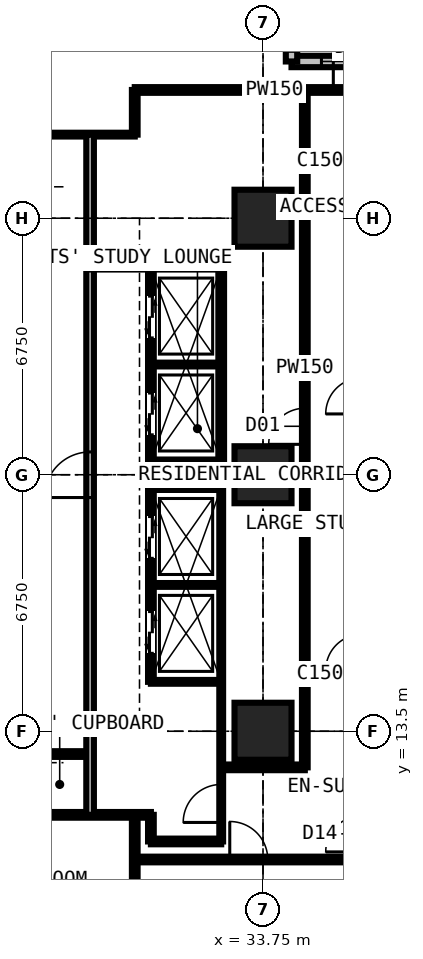
"""IFC4 building model, lengths in metres.
Left out: names, types, materials, properties, quantities, classifications, styles, units other than length and angle.
Written with IfcOpenShell. Run it as: python <this file> out.ifc"""

import sys

from ifc_helpers import new_model, si_unit, direction, frame, frame_2d, origin, origin_2d, place, context, subcontext, project, spatial, rectangle, extrude, element, fill, save


model = new_model("IFC4")
c1 = context("Model", 3, precision=1e-05, world=origin(), true_north=direction((0.0, 1.0)))
c2 = subcontext(c1, "Body", "Model", "MODEL_VIEW")
j1 = project(units=[si_unit("LENGTHUNIT", "METRE"), si_unit("PLANEANGLEUNIT", "RADIAN")], contexts=[c1])
p1 = place(None, origin())
s1 = spatial("IfcSite", under=j1, at=p1, CompositionType="ELEMENT")
p2 = place(p1, origin())
s2 = spatial("IfcBuilding", under=s1, at=p2, CompositionType="ELEMENT")
p3 = place(p2, frame((0.0, 0.0, 123.3)))
s3 = spatial("IfcBuildingStorey", under=s2, at=p3, CompositionType="ELEMENT", Elevation=123.3)
for number, where, z_axis, x_axis in (
    (1, (33.75, 13.5, 0.0), (0.0, 0.0, 1.0), (1.0, 0.0, 0.0)),
    (2, (33.75, 20.25, 0.0), (0.0, 0.0, 1.0), (1.0, 0.0, 0.0)),
    (3, (33.75, 27.0, 0.0), (0.0, 0.0, 1.0), (1.0, 0.0, 0.0)),
):
    element("IfcColumn", number, at=place(p3, frame(where, z_axis=z_axis, x_axis=x_axis)), inside=s3, PredefinedType="COLUMN", context=c2, shape_type="SweptSolid", body=[
        extrude(rectangle(XDim=1.5, YDim=1.5, at=origin_2d()), origin(), (0.0, 0.0, 1.0), 3.6),
    ])
p4 = place(p3, frame((37.875, 31.125, 0.0), z_axis=(0.0, 0.0, 1.0), x_axis=(-1.0, 0.0, 0.0)))
e4 = element("IfcWall", 4, at=p4, inside=s3, PredefinedType="SOLIDWALL", context=c2, shape_type="SweptSolid", body=[
    extrude(rectangle(XDim=3.375, YDim=0.3, at=frame_2d((1.688, 0.0))), origin(), (0.0, 0.0, 1.0), 3.375),
])
p5 = place(p4, frame((0.788, 0.0, 0.6)))
e5 = element("IfcOpeningElement", 5, at=p5, cuts=e4, PredefinedType="OPENING", context=c2, shape_type="SweptSolid", body=[
    extrude(rectangle(XDim=1.8, YDim=2.1, at=frame_2d((0.9, 1.05))), frame((0.0, 0.16, 0.0), z_axis=(0.0, -1.0, 0.0), x_axis=(1.0, 0.0, 0.0)), (0.0, 0.0, 1.0), 0.32),
])
p6 = place(p3, frame((34.5, 31.125, 0.0), z_axis=(0.0, 0.0, 1.0), x_axis=(0.0, 1.0, 0.0)))
e6 = element("IfcWall", 6, at=p6, inside=s3, PredefinedType="SOLIDWALL", context=c2, shape_type="SweptSolid", body=[
    extrude(rectangle(XDim=3.375, YDim=0.3, at=frame_2d((1.688, 0.0))), origin(), (0.0, 0.0, 1.0), 3.375),
])
p7 = place(p6, frame((0.268, 0.0, 0.9)))
e7 = element("IfcOpeningElement", 7, at=p7, cuts=e6, PredefinedType="OPENING", context=c2, shape_type="SweptSolid", body=[
    extrude(rectangle(XDim=1.5, YDim=1.8, at=frame_2d((0.75, 0.9))), frame((0.0, 0.16, 0.0), z_axis=(0.0, -1.0, 0.0), x_axis=(1.0, 0.0, 0.0)), (0.0, 0.0, 1.0), 0.32),
])
p8 = place(p3, frame((10.125, 11.3, 0.0), z_axis=(0.0, 0.0, 1.0), x_axis=(1.0, 0.0, 0.0)))
e8 = element("IfcWall", 8, at=p8, inside=s3, PredefinedType="PARTITIONING", context=c2, shape_type="SweptSolid", body=[
    extrude(rectangle(XDim=20.675, YDim=0.15, at=frame_2d((10.337, 0.0))), origin(), (0.0, 0.0, 1.0), 3.375),
])
p9 = place(p8, frame((8.375, 0.0, 0.0)))
e9 = element("IfcOpeningElement", 9, at=p9, cuts=e8, PredefinedType="OPENING", context=c2, shape_type="SweptSolid", body=[
    extrude(rectangle(XDim=1.0, YDim=2.2, at=frame_2d((0.5, 1.1))), frame((0.0, 0.085, 0.0), z_axis=(0.0, -1.0, 0.0), x_axis=(1.0, 0.0, 0.0)), (0.0, 0.0, 1.0), 0.17),
])
p10 = place(p8, frame((10.975, 0.0, 0.0)))
e10 = element("IfcOpeningElement", 10, at=p10, cuts=e8, PredefinedType="OPENING", context=c2, shape_type="SweptSolid", body=[
    extrude(rectangle(XDim=1.0, YDim=2.2, at=frame_2d((0.5, 1.1))), frame((0.0, 0.085, 0.0), z_axis=(0.0, -1.0, 0.0), x_axis=(1.0, 0.0, 0.0)), (0.0, 0.0, 1.0), 0.17),
])
p11 = place(p8, frame((3.925, 0.0, 0.0)))
e11 = element("IfcOpeningElement", 11, at=p11, cuts=e8, PredefinedType="OPENING", context=c2, shape_type="SweptSolid", body=[
    extrude(rectangle(XDim=0.95, YDim=2.2, at=frame_2d((0.475, 1.1))), frame((0.0, 0.085, 0.0), z_axis=(0.0, -1.0, 0.0), x_axis=(1.0, 0.0, 0.0)), (0.0, 0.0, 1.0), 0.17),
])
p12 = place(p3, frame((11.3, 29.2, 0.0), z_axis=(0.0, 0.0, 1.0), x_axis=(1.0, 0.0, 0.0)))
e12 = element("IfcWall", 12, at=p12, inside=s3, PredefinedType="PARTITIONING", context=c2, shape_type="SweptSolid", body=[
    extrude(rectangle(XDim=19.075, YDim=0.1, at=frame_2d((9.538, 0.0))), origin(), (0.0, 0.0, 1.0), 3.375),
])
p13 = place(p12, frame((6.4, 0.0, 0.0)))
e13 = element("IfcOpeningElement", 13, at=p13, cuts=e12, PredefinedType="OPENING", context=c2, shape_type="SweptSolid", body=[
    extrude(rectangle(XDim=0.95, YDim=2.2, at=frame_2d((0.475, 1.1))), frame((0.0, 0.06, 0.0), z_axis=(0.0, -1.0, 0.0), x_axis=(1.0, 0.0, 0.0)), (0.0, 0.0, 1.0), 0.12),
])
p14 = place(p12, frame((13.15, 0.0, 0.0)))
e14 = element("IfcOpeningElement", 14, at=p14, cuts=e12, PredefinedType="OPENING", context=c2, shape_type="SweptSolid", body=[
    extrude(rectangle(XDim=0.95, YDim=2.2, at=frame_2d((0.475, 1.1))), frame((0.0, 0.06, 0.0), z_axis=(0.0, -1.0, 0.0), x_axis=(1.0, 0.0, 0.0)), (0.0, 0.0, 1.0), 0.12),
])
p15 = place(p12, frame((0.6, 0.0, 0.0)))
e15 = element("IfcOpeningElement", 15, at=p15, cuts=e12, PredefinedType="OPENING", context=c2, shape_type="SweptSolid", body=[
    extrude(rectangle(XDim=1.0, YDim=2.2, at=frame_2d((0.5, 1.1))), frame((0.0, 0.06, 0.0), z_axis=(0.0, -1.0, 0.0), x_axis=(1.0, 0.0, 0.0)), (0.0, 0.0, 1.0), 0.12),
])
p16 = place(p3, frame((27.6, 12.9, 0.0), z_axis=(0.0, 0.0, 1.0), x_axis=(1.0, 0.0, 0.0)))
e16 = element("IfcWall", 16, at=p16, inside=s3, PredefinedType="PARTITIONING", context=c2, shape_type="SweptSolid", body=[
    extrude(rectangle(XDim=1.6, YDim=0.15, at=frame_2d((0.8, 0.0))), origin(), (0.0, 0.0, 1.0), 2.806),
])
p17 = place(p3, frame((29.2, 11.3, 0.0), z_axis=(0.0, 0.0, 1.0), x_axis=(0.0, 1.0, 0.0)))
e17 = element("IfcWall", 17, at=p17, inside=s3, PredefinedType="PARTITIONING", context=c2, shape_type="SweptSolid", body=[
    extrude(rectangle(XDim=17.9, YDim=0.2, at=frame_2d((8.95, 0.0))), origin(), (0.0, 0.0, 1.0), 3.375),
])
p18 = place(p17, frame((8.35, 0.0, 0.0)))
e18 = element("IfcOpeningElement", 18, at=p18, cuts=e17, PredefinedType="OPENING", context=c2, shape_type="SweptSolid", body=[
    extrude(rectangle(XDim=1.2, YDim=2.2, at=frame_2d((0.6, 1.1))), frame((0.0, 0.11, 0.0), z_axis=(0.0, -1.0, 0.0), x_axis=(1.0, 0.0, 0.0)), (0.0, 0.0, 1.0), 0.22),
])
p19 = place(p3, frame((29.2, 25.7, 0.0), z_axis=(0.0, 0.0, 1.0), x_axis=(1.0, 0.0, 0.0)))
e19 = element("IfcWall", 19, at=p19, inside=s3, PredefinedType="SHEAR", context=c2, shape_type="SweptSolid", body=[
    extrude(rectangle(XDim=3.45, YDim=0.1, at=frame_2d((1.725, 0.0))), origin(), (0.0, 0.0, 1.0), 3.375),
])
p20 = place(p3, frame((30.375, -0.734, 0.0), z_axis=(0.0, 0.0, 1.0), x_axis=(0.0, 1.0, 0.0)))
e20 = element("IfcWall", 20, at=p20, inside=s3, PredefinedType="PARTITIONING", context=c2, shape_type="SweptSolid", body=[
    extrude(rectangle(XDim=12.034, YDim=0.15, at=frame_2d((6.017, 0.0))), origin(), (0.0, 0.0, 1.0), 3.375),
])
p21 = place(p3, frame((30.375, 10.125, 0.0), z_axis=(0.0, 0.0, 1.0), x_axis=(1.0, 0.0, 0.0)))
e21 = element("IfcWall", 21, at=p21, inside=s3, PredefinedType="PARTITIONING", context=c2, shape_type="SweptSolid", body=[
    extrude(rectangle(XDim=10.859, YDim=0.15, at=frame_2d((5.429, 0.0))), origin(), (0.0, 0.0, 1.0), 3.375),
])
p22 = place(p21, frame((2.5, 0.0, 0.0)))
e22 = element("IfcOpeningElement", 22, at=p22, cuts=e21, PredefinedType="OPENING", context=c2, shape_type="SweptSolid", body=[
    extrude(rectangle(XDim=1.0, YDim=2.2, at=frame_2d((0.5, 1.1))), frame((0.0, 0.085, 0.0), z_axis=(0.0, -1.0, 0.0), x_axis=(1.0, 0.0, 0.0)), (0.0, 0.0, 1.0), 0.17),
])
p23 = place(p3, frame((30.375, 29.2, 0.0), z_axis=(0.0, 0.0, 1.0), x_axis=(0.0, 1.0, 0.0)))
e23 = element("IfcWall", 23, at=p23, inside=s3, PredefinedType="PARTITIONING", context=c2, shape_type="SweptSolid", body=[
    extrude(rectangle(XDim=1.175, YDim=0.15, at=frame_2d((0.587, 0.0))), origin(), (0.0, 0.0, 1.0), 3.375),
])
p24 = place(p3, frame((30.375, 30.375, 0.0), z_axis=(0.0, 0.0, 1.0), x_axis=(1.0, 0.0, 0.0)))
e24 = element("IfcWall", 24, at=p24, inside=s3, PredefinedType="PARTITIONING", context=c2, shape_type="SweptSolid", body=[
    extrude(rectangle(XDim=7.35, YDim=0.15, at=frame_2d((3.675, 0.0))), origin(), (0.0, 0.0, 1.0), 2.877),
])
p25 = place(p24, frame((5.225, 0.0, 0.0)))
e25 = element("IfcOpeningElement", 25, at=p25, cuts=e24, PredefinedType="OPENING", context=c2, shape_type="SweptSolid", body=[
    extrude(rectangle(XDim=1.0, YDim=2.2, at=frame_2d((0.5, 1.1))), frame((0.0, 0.085, 0.0), z_axis=(0.0, -1.0, 0.0), x_axis=(1.0, 0.0, 0.0)), (0.0, 0.0, 1.0), 0.17),
])
p26 = place(p3, frame((30.8, 10.6, 0.0), z_axis=(0.0, 0.0, 1.0), x_axis=(0.0, 1.0, 0.0)))
e26 = element("IfcWall", 26, at=p26, inside=s3, PredefinedType="PARTITIONING", context=c2, shape_type="SweptSolid", body=[
    extrude(rectangle(XDim=0.7, YDim=0.15, at=frame_2d((0.35, 0.0))), origin(), (0.0, 0.0, 1.0), 3.375),
])
p27 = place(p3, frame((30.8, 10.6, 0.0), z_axis=(0.0, 0.0, 1.0), x_axis=(1.0, 0.0, 0.0)))
e27 = element("IfcWall", 27, at=p27, inside=s3, PredefinedType="PARTITIONING", context=c2, shape_type="SweptSolid", body=[
    extrude(rectangle(XDim=1.85, YDim=0.15, at=frame_2d((0.925, 0.0))), origin(), (0.0, 0.0, 1.0), 3.375),
])
p28 = place(p3, frame((30.8, 14.8, 0.0), z_axis=(0.0, 0.0, 1.0), x_axis=(0.0, 1.0, 0.0)))
e28 = element("IfcWall", 28, at=p28, inside=s3, PredefinedType="PARTITIONING", context=c2, shape_type="SweptSolid", body=[
    extrude(rectangle(XDim=10.9, YDim=0.15, at=frame_2d((5.45, 0.0))), origin(), (0.0, 0.0, 1.0), 3.375),
])
p29 = place(p28, frame((0.75, 0.0, 0.0)))
e29 = element("IfcOpeningElement", 29, at=p29, cuts=e28, PredefinedType="OPENING", context=c2, shape_type="SweptSolid", body=[
    extrude(rectangle(XDim=1.1, YDim=2.2, at=frame_2d((0.55, 1.1))), frame((0.0, 0.085, 0.0), z_axis=(0.0, -1.0, 0.0), x_axis=(1.0, 0.0, 0.0)), (0.0, 0.0, 1.0), 0.17),
])
p30 = place(p28, frame((3.25, 0.0, 0.0)))
e30 = element("IfcOpeningElement", 30, at=p30, cuts=e28, PredefinedType="OPENING", context=c2, shape_type="SweptSolid", body=[
    extrude(rectangle(XDim=1.1, YDim=2.2, at=frame_2d((0.55, 1.1))), frame((0.0, 0.085, 0.0), z_axis=(0.0, -1.0, 0.0), x_axis=(1.0, 0.0, 0.0)), (0.0, 0.0, 1.0), 0.17),
])
p31 = place(p28, frame((6.5, 0.0, 0.0)))
e31 = element("IfcOpeningElement", 31, at=p31, cuts=e28, PredefinedType="OPENING", context=c2, shape_type="SweptSolid", body=[
    extrude(rectangle(XDim=1.1, YDim=2.2, at=frame_2d((0.55, 1.1))), frame((0.0, 0.085, 0.0), z_axis=(0.0, -1.0, 0.0), x_axis=(1.0, 0.0, 0.0)), (0.0, 0.0, 1.0), 0.17),
])
p32 = place(p28, frame((9.05, 0.0, 0.0)))
e32 = element("IfcOpeningElement", 32, at=p32, cuts=e28, PredefinedType="OPENING", context=c2, shape_type="SweptSolid", body=[
    extrude(rectangle(XDim=1.1, YDim=2.2, at=frame_2d((0.55, 1.1))), frame((0.0, 0.085, 0.0), z_axis=(0.0, -1.0, 0.0), x_axis=(1.0, 0.0, 0.0)), (0.0, 0.0, 1.0), 0.17),
])
for number, where, z_axis, x_axis in (
    (33, (30.8, 14.8, 0.0), (0.0, 0.0, 1.0), (1.0, 0.0, 0.0)),
    (34, (30.8, 17.35, 0.0), (0.0, 0.0, 1.0), (1.0, 0.0, 0.0)),
    (35, (30.8, 19.9, 0.0), (0.0, 0.0, 1.0), (1.0, 0.0, 0.0)),
    (36, (30.8, 20.6, 0.0), (0.0, 0.0, 1.0), (1.0, 0.0, 0.0)),
    (37, (30.8, 23.15, 0.0), (0.0, 0.0, 1.0), (1.0, 0.0, 0.0)),
):
    element("IfcWall", number, at=place(p3, frame(where, z_axis=z_axis, x_axis=x_axis)), inside=s3, PredefinedType="SHEAR", context=c2, shape_type="SweptSolid", body=[
        extrude(rectangle(XDim=1.85, YDim=0.1, at=frame_2d((0.925, 0.0))), origin(), (0.0, 0.0, 1.0), 3.375),
    ])
p33 = place(p3, frame((32.65, 10.6, 0.0), z_axis=(0.0, 0.0, 1.0), x_axis=(0.0, 1.0, 0.0)))
e38 = element("IfcWall", 38, at=p33, inside=s3, PredefinedType="SHEAR", context=c2, shape_type="SweptSolid", body=[
    extrude(rectangle(XDim=9.3, YDim=0.1, at=frame_2d((4.65, 0.0))), origin(), (0.0, 0.0, 1.0), 3.375),
])
p34 = place(p33, frame((0.5, 0.0, 0.0)))
e39 = element("IfcOpeningElement", 39, at=p34, cuts=e38, PredefinedType="OPENING", context=c2, shape_type="SweptSolid", body=[
    extrude(rectangle(XDim=1.0, YDim=2.2, at=frame_2d((0.5, 1.1))), frame((0.0, 0.06, 0.0), z_axis=(0.0, -1.0, 0.0), x_axis=(1.0, 0.0, 0.0)), (0.0, 0.0, 1.0), 0.12),
])
p35 = place(p3, frame((32.65, 12.55, 0.0), z_axis=(0.0, 0.0, 1.0), x_axis=(1.0, 0.0, 0.0)))
e40 = element("IfcWall", 40, at=p35, inside=s3, PredefinedType="PARTITIONING", context=c2, shape_type="SweptSolid", body=[
    extrude(rectangle(XDim=2.2, YDim=0.15, at=frame_2d((1.1, 0.0))), origin(), (0.0, 0.0, 1.0), 3.375),
])
p36 = place(p3, frame((32.65, 20.6, 0.0), z_axis=(0.0, 0.0, 1.0), x_axis=(0.0, 1.0, 0.0)))
e41 = element("IfcWall", 41, at=p36, inside=s3, PredefinedType="PARTITIONING", context=c2, shape_type="SweptSolid", body=[
    extrude(rectangle(XDim=5.1, YDim=0.15, at=frame_2d((2.55, 0.0))), origin(), (0.0, 0.0, 1.0), 3.375),
])
p37 = place(p3, frame((34.85, 12.55, 0.0), z_axis=(0.0, 0.0, 1.0), x_axis=(0.0, 1.0, 0.0)))
e42 = element("IfcWall", 42, at=p37, inside=s3, PredefinedType="PARTITIONING", context=c2, shape_type="SweptSolid", body=[
    extrude(rectangle(XDim=17.825, YDim=0.15, at=frame_2d((8.913, 0.0))), origin(), (0.0, 0.0, 1.0), 3.375),
])
p38 = place(p37, frame((8.5, 0.0, 0.0)))
e43 = element("IfcOpeningElement", 43, at=p38, cuts=e42, PredefinedType="OPENING", context=c2, shape_type="SweptSolid", body=[
    extrude(rectangle(XDim=0.95, YDim=2.2, at=frame_2d((0.475, 1.1))), frame((0.0, 0.085, 0.0), z_axis=(0.0, -1.0, 0.0), x_axis=(1.0, 0.0, 0.0)), (0.0, 0.0, 1.0), 0.17),
])
p39 = place(p5, origin())
e44 = element("IfcWindow", 44, at=p39, inside=s3, PartitioningType="SINGLE_PANEL", PredefinedType="WINDOW", context=c2, shape_type="SweptSolid", body=[
    extrude(rectangle(XDim=1.8, YDim=2.1, at=frame_2d((0.9, 1.05))), frame((0.0, 0.03, 0.0), z_axis=(0.0, -1.0, 0.0), x_axis=(1.0, 0.0, 0.0)), (0.0, 0.0, 1.0), 0.06),
])
fill(e5, e44)
p40 = place(p22, origin())
e45 = element("IfcDoor", 45, at=p40, inside=s3, OperationType="SINGLE_SWING_LEFT", PredefinedType="DOOR", context=c2, shape_type="SweptSolid", body=[
    extrude(rectangle(XDim=1.0, YDim=2.2, at=frame_2d((0.5, 1.1))), frame((0.0, 0.025, 0.0), z_axis=(0.0, -1.0, 0.0), x_axis=(1.0, 0.0, 0.0)), (0.0, 0.0, 1.0), 0.05),
])
fill(e22, e45)
p41 = place(p34, origin())
e46 = element("IfcDoor", 46, at=p41, inside=s3, OperationType="SINGLE_SWING_LEFT", PredefinedType="DOOR", context=c2, shape_type="SweptSolid", body=[
    extrude(rectangle(XDim=1.0, YDim=2.2, at=frame_2d((0.5, 1.1))), frame((0.0, 0.025, 0.0), z_axis=(0.0, -1.0, 0.0), x_axis=(1.0, 0.0, 0.0)), (0.0, 0.0, 1.0), 0.05),
])
fill(e39, e46)
p42 = place(p38, origin())
e47 = element("IfcDoor", 47, at=p42, inside=s3, OperationType="SINGLE_SWING_LEFT", PredefinedType="DOOR", context=c2, shape_type="SweptSolid", body=[
    extrude(rectangle(XDim=0.95, YDim=2.2, at=frame_2d((0.475, 1.1))), frame((0.0, 0.025, 0.0), z_axis=(0.0, -1.0, 0.0), x_axis=(1.0, 0.0, 0.0)), (0.0, 0.0, 1.0), 0.05),
])
fill(e43, e47)
p43 = place(p25, origin())
e48 = element("IfcDoor", 48, at=p43, inside=s3, OperationType="SINGLE_SWING_LEFT", PredefinedType="DOOR", context=c2, shape_type="SweptSolid", body=[
    extrude(rectangle(XDim=1.0, YDim=2.2, at=frame_2d((0.5, 1.1))), frame((0.0, 0.025, 0.0), z_axis=(0.0, -1.0, 0.0), x_axis=(1.0, 0.0, 0.0)), (0.0, 0.0, 1.0), 0.05),
])
fill(e25, e48)
p44 = place(p29, origin())
e49 = element("IfcDoor", 49, at=p44, inside=s3, OperationType="DOUBLE_DOOR_SLIDING", PredefinedType="DOOR", context=c2, shape_type="SweptSolid", body=[
    extrude(rectangle(XDim=1.1, YDim=2.2, at=frame_2d((0.55, 1.1))), frame((0.0, 0.025, 0.0), z_axis=(0.0, -1.0, 0.0), x_axis=(1.0, 0.0, 0.0)), (0.0, 0.0, 1.0), 0.05),
])
fill(e29, e49)
p45 = place(p30, origin())
e50 = element("IfcDoor", 50, at=p45, inside=s3, OperationType="DOUBLE_DOOR_SLIDING", PredefinedType="DOOR", context=c2, shape_type="SweptSolid", body=[
    extrude(rectangle(XDim=1.1, YDim=2.2, at=frame_2d((0.55, 1.1))), frame((0.0, 0.025, 0.0), z_axis=(0.0, -1.0, 0.0), x_axis=(1.0, 0.0, 0.0)), (0.0, 0.0, 1.0), 0.05),
])
fill(e30, e50)
p46 = place(p31, origin())
e51 = element("IfcDoor", 51, at=p46, inside=s3, OperationType="DOUBLE_DOOR_SLIDING", PredefinedType="DOOR", context=c2, shape_type="SweptSolid", body=[
    extrude(rectangle(XDim=1.1, YDim=2.2, at=frame_2d((0.55, 1.1))), frame((0.0, 0.025, 0.0), z_axis=(0.0, -1.0, 0.0), x_axis=(1.0, 0.0, 0.0)), (0.0, 0.0, 1.0), 0.05),
])
fill(e31, e51)
p47 = place(p32, origin())
e52 = element("IfcDoor", 52, at=p47, inside=s3, OperationType="DOUBLE_DOOR_SLIDING", PredefinedType="DOOR", context=c2, shape_type="SweptSolid", body=[
    extrude(rectangle(XDim=1.1, YDim=2.2, at=frame_2d((0.55, 1.1))), frame((0.0, 0.025, 0.0), z_axis=(0.0, -1.0, 0.0), x_axis=(1.0, 0.0, 0.0)), (0.0, 0.0, 1.0), 0.05),
])
fill(e32, e52)
p48 = place(p18, origin())
e53 = element("IfcDoor", 53, at=p48, inside=s3, OperationType="DOUBLE_DOOR_SINGLE_SWING", PredefinedType="DOOR", context=c2, shape_type="SweptSolid", body=[
    extrude(rectangle(XDim=1.2, YDim=2.2, at=frame_2d((0.6, 1.1))), frame((0.0, 0.025, 0.0), z_axis=(0.0, -1.0, 0.0), x_axis=(1.0, 0.0, 0.0)), (0.0, 0.0, 1.0), 0.05),
])
fill(e18, e53)
save(model, sys.argv[1])
